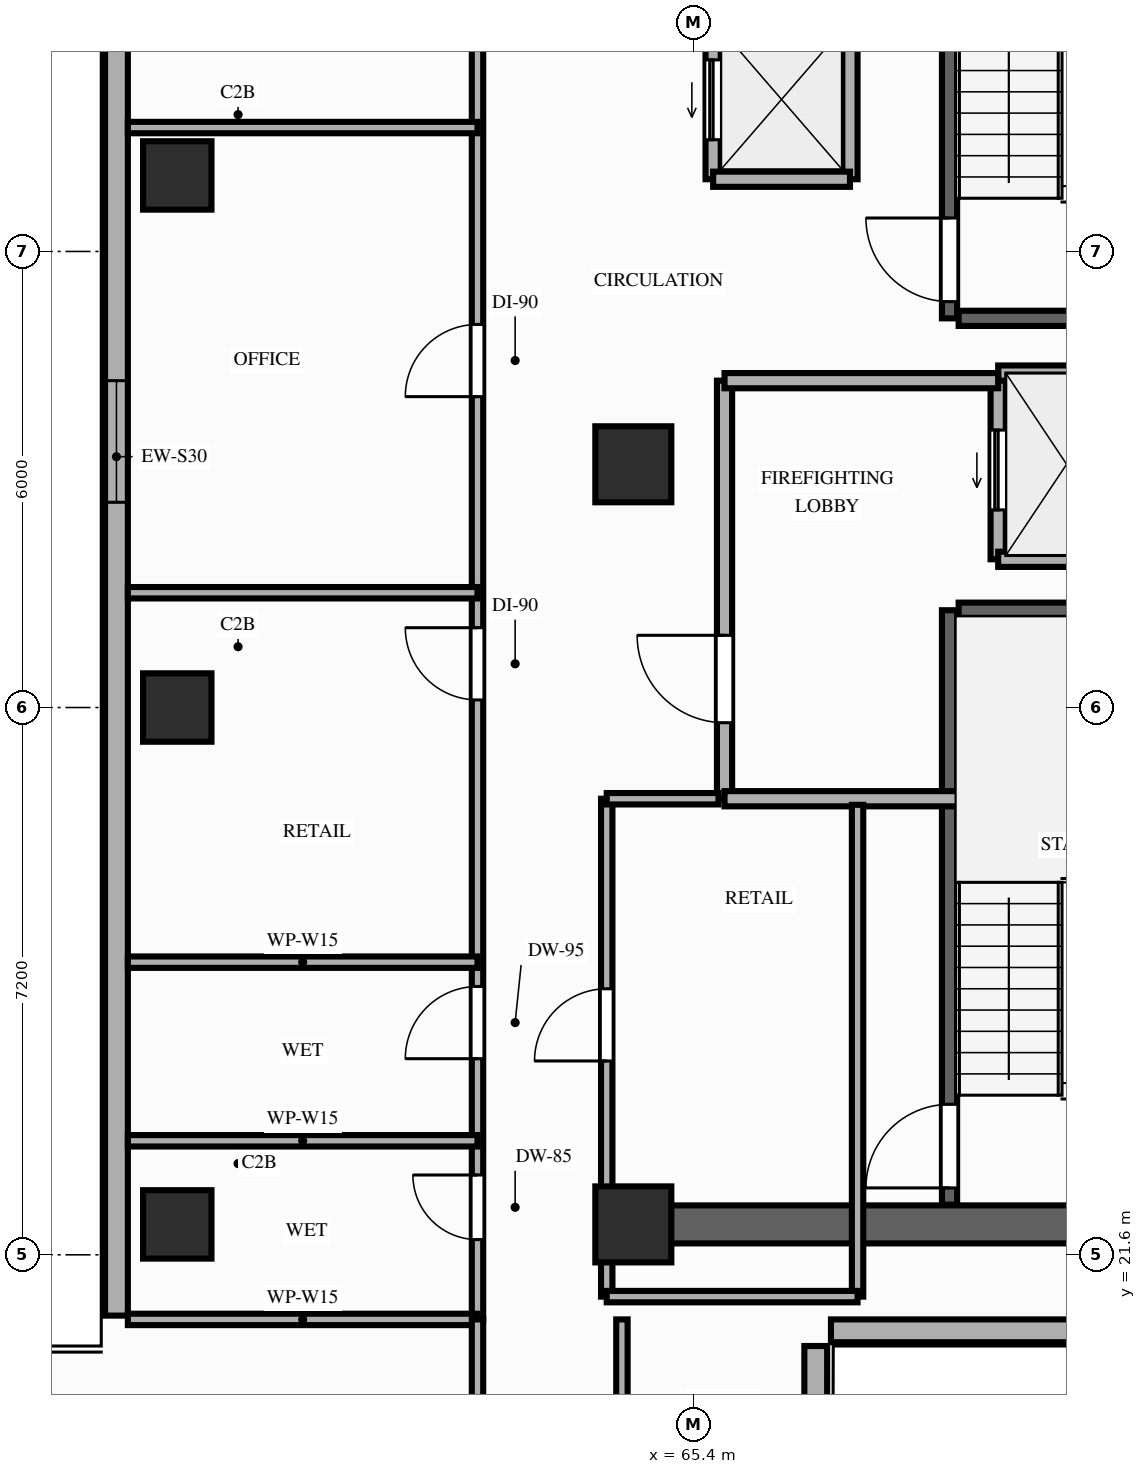
"""IFC4 building model, lengths in metres.
Left out: names, types, materials, properties, quantities, classifications, styles, units other than length and angle.
Written with IfcOpenShell. Run it as: python <this file> out.ifc"""

import sys

from ifc_helpers import new_model, si_unit, direction, frame, frame_2d, origin, origin_2d, place, context, subcontext, project, spatial, rectangle, extrude, element, fill, save


model = new_model("IFC4")
c1 = context("Model", 3, precision=1e-05, world=origin(), true_north=direction((0.0, 1.0)))
c2 = subcontext(c1, "Body", "Model", "MODEL_VIEW")
j1 = project(units=[si_unit("LENGTHUNIT", "METRE"), si_unit("PLANEANGLEUNIT", "RADIAN")], contexts=[c1])
p1 = place(None, origin())
s1 = spatial("IfcSite", under=j1, at=p1, CompositionType="ELEMENT")
p2 = place(p1, origin())
s2 = spatial("IfcBuilding", under=s1, at=p2, CompositionType="ELEMENT")
p3 = place(p2, frame((0.0, 0.0, 75.6)))
s3 = spatial("IfcBuildingStorey", under=s2, at=p3, CompositionType="ELEMENT", Elevation=75.6)
for number, where, z_axis, x_axis in (
    (1, (64.6, 22.0, 0.0), (0.0, 0.0, 1.0), (1.0, 0.0, 0.0)),
    (2, (64.6, 32.0, 0.0), (0.0, 0.0, 1.0), (1.0, 0.0, 0.0)),
):
    element("IfcColumn", number, at=place(p3, frame(where, z_axis=z_axis, x_axis=x_axis)), inside=s3, PredefinedType="COLUMN", context=c2, shape_type="SweptSolid", body=[
        extrude(rectangle(XDim=1.0, YDim=1.0, at=origin_2d()), origin(), (0.0, 0.0, 1.0), 3.8),
    ])
for number, where, z_axis, x_axis in (
    (3, (58.6, 22.0, 0.0), (0.0, 0.0, 1.0), (1.0, 0.0, 0.0)),
    (4, (58.6, 28.8, 0.0), (0.0, 0.0, 1.0), (1.0, 0.0, 0.0)),
    (5, (58.6, 35.8, 0.0), (0.0, 0.0, 1.0), (1.0, 0.0, 0.0)),
):
    element("IfcColumn", number, at=place(p3, frame(where, z_axis=z_axis, x_axis=x_axis)), inside=s3, PredefinedType="COLUMN", context=c2, shape_type="SweptSolid", body=[
        extrude(rectangle(XDim=0.9, YDim=0.9, at=origin_2d()), origin(), (0.0, 0.0, 1.0), 3.8),
    ])
p4 = place(p3, frame((57.8, 43.4, 0.0), z_axis=(0.0, 0.0, 1.0), x_axis=(0.0, -1.0, 0.0)))
e6 = element("IfcWall", 6, at=p4, inside=s3, PredefinedType="STANDARD", context=c2, shape_type="SweptSolid", body=[
    extrude(rectangle(XDim=22.6, YDim=0.3, at=frame_2d((11.3, 0.0))), origin(), (0.0, 0.0, 1.0), 3.14),
])
p5 = place(p4, frame((3.7, 0.0, 0.0)))
e7 = element("IfcOpeningElement", 7, at=p5, cuts=e6, PredefinedType="OPENING", context=c2, shape_type="SweptSolid", body=[
    extrude(rectangle(XDim=1.4, YDim=2.1, at=frame_2d((0.7, 1.05))), frame((0.0, 0.16, 0.0), z_axis=(0.0, -1.0, 0.0), x_axis=(1.0, 0.0, 0.0)), (0.0, 0.0, 1.0), 0.32),
])
p6 = place(p4, frame((10.3, 0.0, 0.85)))
e8 = element("IfcOpeningElement", 8, at=p6, cuts=e6, PredefinedType="OPENING", context=c2, shape_type="SweptSolid", body=[
    extrude(rectangle(XDim=1.6, YDim=1.7, at=frame_2d((0.8, 0.85))), frame((0.0, 0.16, 0.0), z_axis=(0.0, -1.0, 0.0), x_axis=(1.0, 0.0, 0.0)), (0.0, 0.0, 1.0), 0.32),
])
p7 = place(p3, frame((67.0, 7.6, 0.0), z_axis=(0.0, 0.0, 1.0), x_axis=(0.0, 1.0, 0.0)))
e9 = element("IfcWall", 9, at=p7, inside=s3, PredefinedType="STANDARD", context=c2, shape_type="SweptSolid", body=[
    extrude(rectangle(XDim=12.8, YDim=0.3, at=frame_2d((6.4, 0.0))), origin(), (0.0, 0.0, 1.0), 3.56),
])
p8 = place(p3, frame((67.2, 20.6, 0.0), z_axis=(0.0, 0.0, 1.0), x_axis=(1.0, 0.0, 0.0)))
e10 = element("IfcWall", 10, at=p8, inside=s3, PredefinedType="STANDARD", context=c2, shape_type="SweptSolid", body=[
    extrude(rectangle(XDim=5.6, YDim=0.3, at=frame_2d((2.8, 0.0))), origin(), (0.0, 0.0, 1.0), 3.56),
])
p9 = place(p3, frame((64.6, 22.0, 0.0), z_axis=(0.0, 0.0, 1.0), x_axis=(1.0, 0.0, 0.0)))
e11 = element("IfcWall", 11, at=p9, inside=s3, PredefinedType="SHEAR", context=c2, shape_type="SweptSolid", body=[
    extrude(rectangle(XDim=7.5, YDim=0.5, at=frame_2d((3.75, 0.0))), origin(), (0.0, 0.0, 1.0), 3.56),
])
p10 = place(p3, frame((68.76, 22.26, 0.0), z_axis=(0.0, 0.0, 1.0), x_axis=(0.0, 1.0, 0.0)))
e12 = element("IfcWall", 12, at=p10, inside=s3, PredefinedType="SHEAR", context=c2, shape_type="SweptSolid", body=[
    extrude(rectangle(XDim=7.82, YDim=0.2, at=frame_2d((3.91, 0.0))), origin(), (0.0, 0.0, 1.0), 3.56),
])
p11 = place(p10, frame((0.22, 0.0, 0.0)))
e13 = element("IfcOpeningElement", 13, at=p11, cuts=e12, PredefinedType="OPENING", context=c2, shape_type="SweptSolid", body=[
    extrude(rectangle(XDim=1.1, YDim=2.15, at=frame_2d((0.55, 1.075))), frame((0.0, 0.11, 0.0), z_axis=(0.0, -1.0, 0.0), x_axis=(1.0, 0.0, 0.0)), (0.0, 0.0, 1.0), 0.22),
])
p12 = place(p3, frame((68.88, 30.08, 0.0), z_axis=(0.0, 0.0, 1.0), x_axis=(1.0, 0.0, 0.0)))
e14 = element("IfcWall", 14, at=p12, inside=s3, PredefinedType="SHEAR", context=c2, shape_type="SweptSolid", body=[
    extrude(rectangle(XDim=2.88, YDim=0.2, at=frame_2d((1.44, 0.0))), origin(), (0.0, 0.0, 1.0), 3.56),
])
p13 = place(p3, frame((68.76, 33.92, 0.0), z_axis=(0.0, 0.0, 1.0), x_axis=(0.0, 1.0, 0.0)))
e15 = element("IfcWall", 15, at=p13, inside=s3, PredefinedType="SHEAR", context=c2, shape_type="SweptSolid", body=[
    extrude(rectangle(XDim=7.96, YDim=0.2, at=frame_2d((3.98, 0.0))), origin(), (0.0, 0.0, 1.0), 3.56),
])
p14 = place(p13, frame((0.22, 0.0, 0.0)))
e16 = element("IfcOpeningElement", 16, at=p14, cuts=e15, PredefinedType="OPENING", context=c2, shape_type="SweptSolid", body=[
    extrude(rectangle(XDim=1.1, YDim=2.15, at=frame_2d((0.55, 1.075))), frame((0.0, 0.11, 0.0), z_axis=(0.0, -1.0, 0.0), x_axis=(1.0, 0.0, 0.0)), (0.0, 0.0, 1.0), 0.22),
])
p15 = place(p3, frame((68.88, 33.92, 0.0), z_axis=(0.0, 0.0, 1.0), x_axis=(1.0, 0.0, 0.0)))
e17 = element("IfcWall", 17, at=p15, inside=s3, PredefinedType="SHEAR", context=c2, shape_type="SweptSolid", body=[
    extrude(rectangle(XDim=2.88, YDim=0.2, at=frame_2d((1.44, 0.0))), origin(), (0.0, 0.0, 1.0), 3.56),
])
p16 = place(p3, frame((65.65, 35.75, 0.0), z_axis=(0.0, 0.0, 1.0), x_axis=(0.0, 1.0, 0.0)))
e18 = element("IfcWall", 18, at=p16, inside=s3, PredefinedType="MOVABLE", context=c2, shape_type="SweptSolid", body=[
    extrude(rectangle(XDim=6.05, YDim=0.2, at=frame_2d((3.025, 0.0))), origin(), (0.0, 0.0, 1.0), 3.56),
])
p17 = place(p16, frame((0.52, 0.0, 0.0)))
e19 = element("IfcOpeningElement", 19, at=p17, cuts=e18, PredefinedType="OPENING", context=c2, shape_type="SweptSolid", body=[
    extrude(rectangle(XDim=1.05, YDim=2.15, at=frame_2d((0.525, 1.075))), frame((0.0, 0.11, 0.0), z_axis=(0.0, -1.0, 0.0), x_axis=(1.0, 0.0, 0.0)), (0.0, 0.0, 1.0), 0.22),
])
p18 = place(p16, frame((2.48, 0.0, 0.0)))
e20 = element("IfcOpeningElement", 20, at=p18, cuts=e18, PredefinedType="OPENING", context=c2, shape_type="SweptSolid", body=[
    extrude(rectangle(XDim=1.05, YDim=2.15, at=frame_2d((0.525, 1.075))), frame((0.0, 0.11, 0.0), z_axis=(0.0, -1.0, 0.0), x_axis=(1.0, 0.0, 0.0)), (0.0, 0.0, 1.0), 0.22),
])
p19 = place(p16, frame((4.43, 0.0, 0.0)))
e21 = element("IfcOpeningElement", 21, at=p19, cuts=e18, PredefinedType="OPENING", context=c2, shape_type="SweptSolid", body=[
    extrude(rectangle(XDim=1.05, YDim=2.15, at=frame_2d((0.525, 1.075))), frame((0.0, 0.11, 0.0), z_axis=(0.0, -1.0, 0.0), x_axis=(1.0, 0.0, 0.0)), (0.0, 0.0, 1.0), 0.22),
])
p20 = place(p3, frame((67.45, 35.75, 0.0), z_axis=(0.0, 0.0, 1.0), x_axis=(0.0, 1.0, 0.0)))
e22 = element("IfcWall", 22, at=p20, inside=s3, PredefinedType="MOVABLE", context=c2, shape_type="SweptSolid", body=[
    extrude(rectangle(XDim=6.05, YDim=0.2, at=frame_2d((3.025, 0.0))), origin(), (0.0, 0.0, 1.0), 3.56),
])
p21 = place(p3, frame((65.65, 35.75, 0.0), z_axis=(0.0, 0.0, 1.0), x_axis=(1.0, 0.0, 0.0)))
e23 = element("IfcWall", 23, at=p21, inside=s3, PredefinedType="MOVABLE", context=c2, shape_type="SweptSolid", body=[
    extrude(rectangle(XDim=1.8, YDim=0.2, at=frame_2d((0.9, 0.0))), origin(), (0.0, 0.0, 1.0), 3.56),
])
p22 = place(p3, frame((69.4, 30.75, 0.0), z_axis=(0.0, 0.0, 1.0), x_axis=(0.0, 1.0, 0.0)))
e24 = element("IfcWall", 24, at=p22, inside=s3, PredefinedType="MOVABLE", context=c2, shape_type="SweptSolid", body=[
    extrude(rectangle(XDim=2.45, YDim=0.2, at=frame_2d((1.225, 0.0))), origin(), (0.0, 0.0, 1.0), 3.56),
])
p23 = place(p22, frame((0.65, 0.0, 0.0)))
e25 = element("IfcOpeningElement", 25, at=p23, cuts=e24, PredefinedType="OPENING", context=c2, shape_type="SweptSolid", body=[
    extrude(rectangle(XDim=1.05, YDim=2.15, at=frame_2d((0.525, 1.075))), frame((0.0, 0.11, 0.0), z_axis=(0.0, -1.0, 0.0), x_axis=(1.0, 0.0, 0.0)), (0.0, 0.0, 1.0), 0.22),
])
for number, where, z_axis, x_axis in (
    (26, (69.4, 33.2, 0.0), (0.0, 0.0, 1.0), (1.0, 0.0, 0.0)),
    (27, (69.4, 30.75, 0.0), (0.0, 0.0, 1.0), (1.0, 0.0, 0.0)),
):
    element("IfcWall", number, at=place(p3, frame(where, z_axis=z_axis, x_axis=x_axis)), inside=s3, PredefinedType="MOVABLE", context=c2, shape_type="SweptSolid", body=[
        extrude(rectangle(XDim=1.75, YDim=0.2, at=frame_2d((0.875, 0.0))), origin(), (0.0, 0.0, 1.0), 3.56),
    ])
p24 = place(p3, frame((65.8, 27.6, 0.0), z_axis=(0.0, 0.0, 1.0), x_axis=(0.0, 1.0, 0.0)))
e28 = element("IfcWall", 28, at=p24, inside=s3, PredefinedType="PARTITIONING", context=c2, shape_type="SweptSolid", body=[
    extrude(rectangle(XDim=5.5, YDim=0.2, at=frame_2d((2.75, 0.0))), origin(), (0.0, 0.0, 1.0), 3.56),
])
p25 = place(p24, frame((1.0, 0.0, 0.0)))
e29 = element("IfcOpeningElement", 29, at=p25, cuts=e28, PredefinedType="OPENING", context=c2, shape_type="SweptSolid", body=[
    extrude(rectangle(XDim=1.15, YDim=2.15, at=frame_2d((0.575, 1.075))), frame((0.0, 0.11, 0.0), z_axis=(0.0, -1.0, 0.0), x_axis=(1.0, 0.0, 0.0)), (0.0, 0.0, 1.0), 0.22),
])
p26 = place(p3, frame((65.8, 33.1, 0.0), z_axis=(0.0, 0.0, 1.0), x_axis=(1.0, 0.0, 0.0)))
e30 = element("IfcWall", 30, at=p26, inside=s3, PredefinedType="PARTITIONING", context=c2, shape_type="SweptSolid", body=[
    extrude(rectangle(XDim=3.6, YDim=0.2, at=frame_2d((1.8, 0.0))), origin(), (0.0, 0.0, 1.0), 3.56),
])
p27 = place(p3, frame((65.8, 27.6, 0.0), z_axis=(0.0, 0.0, 1.0), x_axis=(1.0, 0.0, 0.0)))
e31 = element("IfcWall", 31, at=p27, inside=s3, PredefinedType="PARTITIONING", context=c2, shape_type="SweptSolid", body=[
    extrude(rectangle(XDim=3.4, YDim=0.2, at=frame_2d((1.7, 0.0))), origin(), (0.0, 0.0, 1.0), 3.56),
])
p28 = place(p3, frame((64.25, 21.05, 0.0), z_axis=(0.0, 0.0, 1.0), x_axis=(0.0, 1.0, 0.0)))
e32 = element("IfcWall", 32, at=p28, inside=s3, PredefinedType="PARTITIONING", context=c2, shape_type="SweptSolid", body=[
    extrude(rectangle(XDim=6.55, YDim=0.15, at=frame_2d((3.275, 0.0))), origin(), (0.0, 0.0, 1.0), 3.14),
])
p29 = place(p28, frame((3.1, 0.0, 0.0)))
e33 = element("IfcOpeningElement", 33, at=p29, cuts=e32, PredefinedType="OPENING", context=c2, shape_type="SweptSolid", body=[
    extrude(rectangle(XDim=0.95, YDim=2.15, at=frame_2d((0.475, 1.075))), frame((0.0, 0.085, 0.0), z_axis=(0.0, -1.0, 0.0), x_axis=(1.0, 0.0, 0.0)), (0.0, 0.0, 1.0), 0.17),
])
p30 = place(p3, frame((67.55, 21.05, 0.0), z_axis=(0.0, 0.0, 1.0), x_axis=(0.0, 1.0, 0.0)))
e34 = element("IfcWall", 34, at=p30, inside=s3, PredefinedType="PARTITIONING", context=c2, shape_type="SweptSolid", body=[
    extrude(rectangle(XDim=6.47, YDim=0.15, at=frame_2d((3.235, 0.0))), origin(), (0.0, 0.0, 1.0), 3.14),
])
p31 = place(p3, frame((64.25, 21.05, 0.0), z_axis=(0.0, 0.0, 1.0), x_axis=(1.0, 0.0, 0.0)))
e35 = element("IfcWall", 35, at=p31, inside=s3, PredefinedType="PARTITIONING", context=c2, shape_type="SweptSolid", body=[
    extrude(rectangle(XDim=3.3, YDim=0.15, at=frame_2d((1.65, 0.0))), origin(), (0.0, 0.0, 1.0), 3.14),
])
p32 = place(p3, frame((64.25, 27.6, 0.0), z_axis=(0.0, 0.0, 1.0), x_axis=(1.0, 0.0, 0.0)))
e36 = element("IfcWall", 36, at=p32, inside=s3, PredefinedType="PARTITIONING", context=c2, shape_type="SweptSolid", body=[
    extrude(rectangle(XDim=1.47, YDim=0.15, at=frame_2d((0.735, 0.0))), origin(), (0.0, 0.0, 1.0), 3.14),
])
p33 = place(p3, frame((62.55, 20.75, 0.0), z_axis=(0.0, 0.0, 1.0), x_axis=(0.0, 1.0, 0.0)))
e37 = element("IfcWall", 37, at=p33, inside=s3, PredefinedType="PARTITIONING", context=c2, shape_type="SweptSolid", body=[
    extrude(rectangle(XDim=22.7, YDim=0.15, at=frame_2d((11.35, 0.0))), origin(), (0.0, 0.0, 1.0), 3.14),
])
p34 = place(p33, frame((1.05, 0.0, 0.0)))
e38 = element("IfcOpeningElement", 38, at=p34, cuts=e37, PredefinedType="OPENING", context=c2, shape_type="SweptSolid", body=[
    extrude(rectangle(XDim=0.85, YDim=2.1, at=frame_2d((0.425, 1.05))), frame((0.0, 0.085, 0.0), z_axis=(0.0, -1.0, 0.0), x_axis=(1.0, 0.0, 0.0)), (0.0, 0.0, 1.0), 0.17),
])
p35 = place(p33, frame((3.43, 0.0, 0.0)))
e39 = element("IfcOpeningElement", 39, at=p35, cuts=e37, PredefinedType="OPENING", context=c2, shape_type="SweptSolid", body=[
    extrude(rectangle(XDim=0.95, YDim=2.1, at=frame_2d((0.475, 1.05))), frame((0.0, 0.085, 0.0), z_axis=(0.0, -1.0, 0.0), x_axis=(1.0, 0.0, 0.0)), (0.0, 0.0, 1.0), 0.17),
])
p36 = place(p33, frame((8.15, 0.0, 0.0)))
e40 = element("IfcOpeningElement", 40, at=p36, cuts=e37, PredefinedType="OPENING", context=c2, shape_type="SweptSolid", body=[
    extrude(rectangle(XDim=0.95, YDim=2.15, at=frame_2d((0.475, 1.075))), frame((0.0, 0.085, 0.0), z_axis=(0.0, -1.0, 0.0), x_axis=(1.0, 0.0, 0.0)), (0.0, 0.0, 1.0), 0.17),
])
p37 = place(p33, frame((12.14, 0.0, 0.0)))
e41 = element("IfcOpeningElement", 41, at=p37, cuts=e37, PredefinedType="OPENING", context=c2, shape_type="SweptSolid", body=[
    extrude(rectangle(XDim=0.95, YDim=2.15, at=frame_2d((0.475, 1.075))), frame((0.0, 0.085, 0.0), z_axis=(0.0, -1.0, 0.0), x_axis=(1.0, 0.0, 0.0)), (0.0, 0.0, 1.0), 0.17),
])
p38 = place(p33, frame((18.71, 0.0, 0.0)))
e42 = element("IfcOpeningElement", 42, at=p38, cuts=e37, PredefinedType="OPENING", context=c2, shape_type="SweptSolid", body=[
    extrude(rectangle(XDim=0.95, YDim=2.15, at=frame_2d((0.475, 1.075))), frame((0.0, 0.085, 0.0), z_axis=(0.0, -1.0, 0.0), x_axis=(1.0, 0.0, 0.0)), (0.0, 0.0, 1.0), 0.17),
])
for number, where, z_axis, x_axis in (
    (43, (57.95, 20.75, 0.0), (0.0, 0.0, 1.0), (1.0, 0.0, 0.0)),
    (44, (57.95, 23.1, 0.0), (0.0, 0.0, 1.0), (1.0, 0.0, 0.0)),
    (45, (57.95, 25.45, 0.0), (0.0, 0.0, 1.0), (1.0, 0.0, 0.0)),
    (46, (57.95, 30.31, 0.0), (0.0, 0.0, 1.0), (1.0, 0.0, 0.0)),
    (47, (57.95, 36.43, 0.0), (0.0, 0.0, 1.0), (1.0, 0.0, 0.0)),
):
    element("IfcWall", number, at=place(p3, frame(where, z_axis=z_axis, x_axis=x_axis)), inside=s3, PredefinedType="PARTITIONING", context=c2, shape_type="SweptSolid", body=[
        extrude(rectangle(XDim=4.6, YDim=0.15, at=frame_2d((2.3, 0.0))), origin(), (0.0, 0.0, 1.0), 3.14),
    ])
p39 = place(p3, frame((62.55, 14.0, 0.0), z_axis=(0.0, 0.0, 1.0), x_axis=(0.0, 1.0, 0.0)))
e48 = element("IfcWall", 48, at=p39, inside=s3, PredefinedType="PARTITIONING", context=c2, shape_type="SweptSolid", body=[
    extrude(rectangle(XDim=6.75, YDim=0.15, at=frame_2d((3.375, 0.0))), origin(), (0.0, 0.0, 1.0), 3.14),
])
p40 = place(p39, frame((2.6, 0.0, 0.0)))
e49 = element("IfcOpeningElement", 49, at=p40, cuts=e48, PredefinedType="OPENING", context=c2, shape_type="SweptSolid", body=[
    extrude(rectangle(XDim=0.95, YDim=2.15, at=frame_2d((0.475, 1.075))), frame((0.0, 0.085, 0.0), z_axis=(0.0, -1.0, 0.0), x_axis=(1.0, 0.0, 0.0)), (0.0, 0.0, 1.0), 0.17),
])
p41 = place(p3, frame((64.45, 14.0, 0.0), z_axis=(0.0, 0.0, 1.0), x_axis=(0.0, 1.0, 0.0)))
e50 = element("IfcWall", 50, at=p41, inside=s3, PredefinedType="PARTITIONING", context=c2, shape_type="SweptSolid", body=[
    extrude(rectangle(XDim=6.75, YDim=0.15, at=frame_2d((3.375, 0.0))), origin(), (0.0, 0.0, 1.0), 3.14),
])
p42 = place(p41, frame((3.24, 0.0, 0.0)))
e51 = element("IfcOpeningElement", 51, at=p42, cuts=e50, PredefinedType="OPENING", context=c2, shape_type="SweptSolid", body=[
    extrude(rectangle(XDim=0.95, YDim=2.15, at=frame_2d((0.475, 1.075))), frame((0.0, 0.085, 0.0), z_axis=(0.0, -1.0, 0.0), x_axis=(1.0, 0.0, 0.0)), (0.0, 0.0, 1.0), 0.17),
])
p43 = place(p6, origin())
e52 = element("IfcWindow", 52, at=p43, inside=s3, PartitioningType="SINGLE_PANEL", PredefinedType="WINDOW", context=c2, shape_type="SweptSolid", body=[
    extrude(rectangle(XDim=1.6, YDim=1.7, at=frame_2d((0.8, 0.85))), frame((0.0, 0.03, 0.0), z_axis=(0.0, -1.0, 0.0), x_axis=(1.0, 0.0, 0.0)), (0.0, 0.0, 1.0), 0.06),
])
fill(e8, e52)
p44 = place(p11, origin())
e53 = element("IfcDoor", 53, at=p44, inside=s3, OperationType="SINGLE_SWING_LEFT", PredefinedType="DOOR", context=c2, shape_type="SweptSolid", body=[
    extrude(rectangle(XDim=1.1, YDim=2.15, at=frame_2d((0.55, 1.075))), frame((0.0, 0.025, 0.0), z_axis=(0.0, -1.0, 0.0), x_axis=(1.0, 0.0, 0.0)), (0.0, 0.0, 1.0), 0.05),
])
fill(e13, e53)
p45 = place(p14, origin())
e54 = element("IfcDoor", 54, at=p45, inside=s3, OperationType="SINGLE_SWING_RIGHT", PredefinedType="DOOR", context=c2, shape_type="SweptSolid", body=[
    extrude(rectangle(XDim=1.1, YDim=2.15, at=frame_2d((0.55, 1.075))), frame((0.0, 0.025, 0.0), z_axis=(0.0, -1.0, 0.0), x_axis=(1.0, 0.0, 0.0)), (0.0, 0.0, 1.0), 0.05),
])
fill(e16, e54)
p46 = place(p17, origin())
e55 = element("IfcDoor", 55, at=p46, inside=s3, OperationType="SLIDING_TO_LEFT", PredefinedType="DOOR", context=c2, shape_type="SweptSolid", body=[
    extrude(rectangle(XDim=1.05, YDim=2.15, at=frame_2d((0.525, 1.075))), frame((0.0, 0.025, 0.0), z_axis=(0.0, -1.0, 0.0), x_axis=(1.0, 0.0, 0.0)), (0.0, 0.0, 1.0), 0.05),
])
fill(e19, e55)
p47 = place(p23, origin())
e56 = element("IfcDoor", 56, at=p47, inside=s3, OperationType="SLIDING_TO_LEFT", PredefinedType="DOOR", context=c2, shape_type="SweptSolid", body=[
    extrude(rectangle(XDim=1.05, YDim=2.15, at=frame_2d((0.525, 1.075))), frame((0.0, 0.025, 0.0), z_axis=(0.0, -1.0, 0.0), x_axis=(1.0, 0.0, 0.0)), (0.0, 0.0, 1.0), 0.05),
])
fill(e25, e56)
p48 = place(p25, origin())
e57 = element("IfcDoor", 57, at=p48, inside=s3, OperationType="SINGLE_SWING_RIGHT", PredefinedType="DOOR", context=c2, shape_type="SweptSolid", body=[
    extrude(rectangle(XDim=1.15, YDim=2.15, at=frame_2d((0.575, 1.075))), frame((0.0, 0.025, 0.0), z_axis=(0.0, -1.0, 0.0), x_axis=(1.0, 0.0, 0.0)), (0.0, 0.0, 1.0), 0.05),
])
fill(e29, e57)
p49 = place(p29, origin())
e58 = element("IfcDoor", 58, at=p49, inside=s3, OperationType="SINGLE_SWING_LEFT", PredefinedType="DOOR", context=c2, shape_type="SweptSolid", body=[
    extrude(rectangle(XDim=0.95, YDim=2.15, at=frame_2d((0.475, 1.075))), frame((0.0, 0.025, 0.0), z_axis=(0.0, -1.0, 0.0), x_axis=(1.0, 0.0, 0.0)), (0.0, 0.0, 1.0), 0.05),
])
fill(e33, e58)
p50 = place(p34, origin())
e59 = element("IfcDoor", 59, at=p50, inside=s3, OperationType="SINGLE_SWING_RIGHT", PredefinedType="DOOR", context=c2, shape_type="SweptSolid", body=[
    extrude(rectangle(XDim=0.85, YDim=2.1, at=frame_2d((0.425, 1.05))), frame((0.0, 0.025, 0.0), z_axis=(0.0, -1.0, 0.0), x_axis=(1.0, 0.0, 0.0)), (0.0, 0.0, 1.0), 0.05),
])
fill(e38, e59)
p51 = place(p35, origin())
e60 = element("IfcDoor", 60, at=p51, inside=s3, OperationType="SINGLE_SWING_LEFT", PredefinedType="DOOR", context=c2, shape_type="SweptSolid", body=[
    extrude(rectangle(XDim=0.95, YDim=2.1, at=frame_2d((0.475, 1.05))), frame((0.0, 0.025, 0.0), z_axis=(0.0, -1.0, 0.0), x_axis=(1.0, 0.0, 0.0)), (0.0, 0.0, 1.0), 0.05),
])
fill(e39, e60)
p52 = place(p36, origin())
e61 = element("IfcDoor", 61, at=p52, inside=s3, OperationType="SINGLE_SWING_RIGHT", PredefinedType="DOOR", context=c2, shape_type="SweptSolid", body=[
    extrude(rectangle(XDim=0.95, YDim=2.15, at=frame_2d((0.475, 1.075))), frame((0.0, 0.025, 0.0), z_axis=(0.0, -1.0, 0.0), x_axis=(1.0, 0.0, 0.0)), (0.0, 0.0, 1.0), 0.05),
])
fill(e40, e61)
p53 = place(p37, origin())
e62 = element("IfcDoor", 62, at=p53, inside=s3, OperationType="SINGLE_SWING_LEFT", PredefinedType="DOOR", context=c2, shape_type="SweptSolid", body=[
    extrude(rectangle(XDim=0.95, YDim=2.15, at=frame_2d((0.475, 1.075))), frame((0.0, 0.025, 0.0), z_axis=(0.0, -1.0, 0.0), x_axis=(1.0, 0.0, 0.0)), (0.0, 0.0, 1.0), 0.05),
])
fill(e41, e62)
save(model, sys.argv[1])
